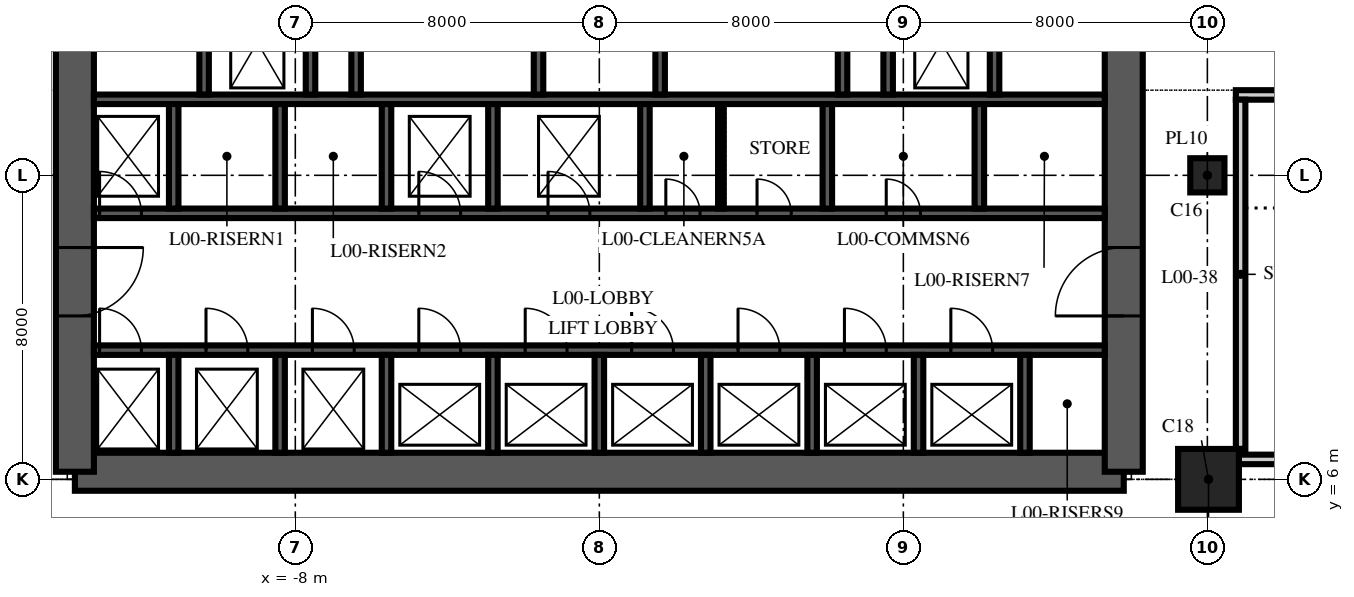
"""IFC4 building model, lengths in metres.
Left out: names, types, materials, properties, quantities, classifications, styles, units other than length and angle.
Written with IfcOpenShell. Run it as: python <this file> out.ifc"""

import sys

from ifc_helpers import new_model, si_unit, direction, frame, frame_2d, origin, origin_2d, place, context, subcontext, project, spatial, polyline, rectangle, outline, extrude, element, fill, save


model = new_model("IFC4")
c1 = context("Model", 3, precision=1e-05, world=origin(), true_north=direction((0.0, 1.0)))
c2 = subcontext(c1, "Body", "Model", "MODEL_VIEW")
j1 = project(units=[si_unit("LENGTHUNIT", "METRE"), si_unit("PLANEANGLEUNIT", "RADIAN")], contexts=[c1])
p1 = place(None, origin())
s1 = spatial("IfcSite", under=j1, at=p1, CompositionType="ELEMENT")
p2 = place(p1, origin())
s2 = spatial("IfcBuilding", under=s1, at=p2, CompositionType="ELEMENT")
p3 = place(p2, origin())
s3 = spatial("IfcBuildingStorey", under=s2, at=p3, CompositionType="ELEMENT", Elevation=0.0)
p4 = place(p3, frame((16.03, 6.0, 0.0), z_axis=(0.0, 0.0, 1.0), x_axis=(1.0, 0.0, 0.0)))
e1 = element("IfcColumn", 1, at=p4, inside=s3, PredefinedType="COLUMN", context=c2, shape_type="SweptSolid", body=[
    extrude(rectangle(XDim=1.6, YDim=1.6, at=origin_2d()), origin(), (0.0, 0.0, 1.0), 6.0),
])
p5 = place(p3, frame((16.0, 14.0, 0.0), z_axis=(0.0, 0.0, 1.0), x_axis=(1.0, 0.0, 0.0)))
e2 = element("IfcColumn", 2, at=p5, inside=s3, PredefinedType="COLUMN", context=c2, shape_type="SweptSolid", body=[
    extrude(rectangle(XDim=0.9, YDim=0.9, at=origin_2d()), origin(), (0.0, 0.0, 1.0), 6.0),
])
p6 = place(p3, frame((-13.8, 6.2, 0.0), z_axis=(0.0, 0.0, 1.0), x_axis=(1.0, 0.0, 0.0)))
e3 = element("IfcWall", 3, at=p6, inside=s3, PredefinedType="SHEAR", context=c2, shape_type="SweptSolid", body=[
    extrude(rectangle(XDim=27.6, YDim=1.0, at=frame_2d((13.8, 0.0))), origin(), (0.0, 0.0, 1.0), 6.0),
])
p7 = place(p3, frame((13.8, 6.2, 0.0), z_axis=(0.0, 0.0, 1.0), x_axis=(0.0, 1.0, 0.0)))
e4 = element("IfcWall", 4, at=p7, inside=s3, PredefinedType="SHEAR", context=c2, shape_type="SweptSolid", body=[
    extrude(outline(polyline([(0.0, -0.5), (17.6, -0.5), (17.6, 0.0), (17.1, 0.0), (17.1, 0.5), (0.5, 0.5), (0.5, 0.0), (0.0, 0.0), (0.0, -0.5)])), origin(), (0.0, 0.0, 1.0), 6.0),
])
p8 = place(p7, frame((4.1, 0.0, 0.0)))
e5 = element("IfcOpeningElement", 5, at=p8, cuts=e4, PredefinedType="OPENING", context=c2, shape_type="SweptSolid", body=[
    extrude(rectangle(XDim=1.8, YDim=2.4, at=frame_2d((0.9, 1.2))), frame((0.0, 0.515, 0.0), z_axis=(0.0, -1.0, 0.0), x_axis=(1.0, 0.0, 0.0)), (0.0, 0.0, 1.0), 1.03),
])
p9 = place(p3, frame((-13.8, 23.8, 0.0), z_axis=(0.0, 0.0, 1.0), x_axis=(0.0, -1.0, 0.0)))
e6 = element("IfcWall", 6, at=p9, inside=s3, PredefinedType="SHEAR", context=c2, shape_type="SweptSolid", body=[
    extrude(outline(polyline([(0.0, -0.5), (17.6, -0.5), (17.6, 0.0), (17.1, 0.0), (17.1, 0.5), (0.5, 0.5), (0.5, 0.0), (0.0, 0.0), (0.0, -0.5)])), origin(), (0.0, 0.0, 1.0), 6.0),
])
p10 = place(p9, frame((11.7, 0.0, 0.0)))
e7 = element("IfcOpeningElement", 7, at=p10, cuts=e6, PredefinedType="OPENING", context=c2, shape_type="SweptSolid", body=[
    extrude(rectangle(XDim=1.8, YDim=2.4, at=frame_2d((0.9, 1.2))), frame((0.0, 0.515, 0.0), z_axis=(0.0, -1.0, 0.0), x_axis=(1.0, 0.0, 0.0)), (0.0, 0.0, 1.0), 1.03),
])
p11 = place(p3, frame((-13.3, 9.4, 0.0), z_axis=(0.0, 0.0, 1.0), x_axis=(1.0, 0.0, 0.0)))
e8 = element("IfcWall", 8, at=p11, inside=s3, PredefinedType="SHEAR", context=c2, shape_type="SweptSolid", body=[
    extrude(rectangle(XDim=26.6, YDim=0.25, at=frame_2d((13.3, 0.0))), origin(), (0.0, 0.0, 1.0), 6.0),
])
p12 = place(p11, frame((0.15, 0.0, 0.0)))
e9 = element("IfcOpeningElement", 9, at=p12, cuts=e8, PredefinedType="OPENING", context=c2, shape_type="SweptSolid", body=[
    extrude(rectangle(XDim=1.1, YDim=2.1, at=frame_2d((0.55, 1.05))), frame((0.0, 0.14, 0.0), z_axis=(0.0, -1.0, 0.0), x_axis=(1.0, 0.0, 0.0)), (0.0, 0.0, 1.0), 0.28),
])
p13 = place(p11, frame((2.95, 0.0, 0.0)))
e10 = element("IfcOpeningElement", 10, at=p13, cuts=e8, PredefinedType="OPENING", context=c2, shape_type="SweptSolid", body=[
    extrude(rectangle(XDim=1.1, YDim=2.1, at=frame_2d((0.55, 1.05))), frame((0.0, 0.14, 0.0), z_axis=(0.0, -1.0, 0.0), x_axis=(1.0, 0.0, 0.0)), (0.0, 0.0, 1.0), 0.28),
])
p14 = place(p11, frame((5.75, 0.0, 0.0)))
e11 = element("IfcOpeningElement", 11, at=p14, cuts=e8, PredefinedType="OPENING", context=c2, shape_type="SweptSolid", body=[
    extrude(rectangle(XDim=1.1, YDim=2.1, at=frame_2d((0.55, 1.05))), frame((0.0, 0.14, 0.0), z_axis=(0.0, -1.0, 0.0), x_axis=(1.0, 0.0, 0.0)), (0.0, 0.0, 1.0), 0.28),
])
p15 = place(p11, frame((8.55, 0.0, 0.0)))
e12 = element("IfcOpeningElement", 12, at=p15, cuts=e8, PredefinedType="OPENING", context=c2, shape_type="SweptSolid", body=[
    extrude(rectangle(XDim=1.1, YDim=2.1, at=frame_2d((0.55, 1.05))), frame((0.0, 0.14, 0.0), z_axis=(0.0, -1.0, 0.0), x_axis=(1.0, 0.0, 0.0)), (0.0, 0.0, 1.0), 0.28),
])
p16 = place(p11, frame((11.35, 0.0, 0.0)))
e13 = element("IfcOpeningElement", 13, at=p16, cuts=e8, PredefinedType="OPENING", context=c2, shape_type="SweptSolid", body=[
    extrude(rectangle(XDim=1.1, YDim=2.1, at=frame_2d((0.55, 1.05))), frame((0.0, 0.14, 0.0), z_axis=(0.0, -1.0, 0.0), x_axis=(1.0, 0.0, 0.0)), (0.0, 0.0, 1.0), 0.28),
])
p17 = place(p11, frame((14.15, 0.0, 0.0)))
e14 = element("IfcOpeningElement", 14, at=p17, cuts=e8, PredefinedType="OPENING", context=c2, shape_type="SweptSolid", body=[
    extrude(rectangle(XDim=1.1, YDim=2.1, at=frame_2d((0.55, 1.05))), frame((0.0, 0.14, 0.0), z_axis=(0.0, -1.0, 0.0), x_axis=(1.0, 0.0, 0.0)), (0.0, 0.0, 1.0), 0.28),
])
p18 = place(p11, frame((16.95, 0.0, 0.0)))
e15 = element("IfcOpeningElement", 15, at=p18, cuts=e8, PredefinedType="OPENING", context=c2, shape_type="SweptSolid", body=[
    extrude(rectangle(XDim=1.1, YDim=2.1, at=frame_2d((0.55, 1.05))), frame((0.0, 0.14, 0.0), z_axis=(0.0, -1.0, 0.0), x_axis=(1.0, 0.0, 0.0)), (0.0, 0.0, 1.0), 0.28),
])
p19 = place(p11, frame((19.75, 0.0, 0.0)))
e16 = element("IfcOpeningElement", 16, at=p19, cuts=e8, PredefinedType="OPENING", context=c2, shape_type="SweptSolid", body=[
    extrude(rectangle(XDim=1.1, YDim=2.1, at=frame_2d((0.55, 1.05))), frame((0.0, 0.14, 0.0), z_axis=(0.0, -1.0, 0.0), x_axis=(1.0, 0.0, 0.0)), (0.0, 0.0, 1.0), 0.28),
])
p20 = place(p11, frame((22.55, 0.0, 0.0)))
e17 = element("IfcOpeningElement", 17, at=p20, cuts=e8, PredefinedType="OPENING", context=c2, shape_type="SweptSolid", body=[
    extrude(rectangle(XDim=1.1, YDim=2.1, at=frame_2d((0.55, 1.05))), frame((0.0, 0.14, 0.0), z_axis=(0.0, -1.0, 0.0), x_axis=(1.0, 0.0, 0.0)), (0.0, 0.0, 1.0), 0.28),
])
p21 = place(p3, frame((-13.3, 13.0, 0.0), z_axis=(0.0, 0.0, 1.0), x_axis=(1.0, 0.0, 0.0)))
e18 = element("IfcWall", 18, at=p21, inside=s3, PredefinedType="SHEAR", context=c2, shape_type="SweptSolid", body=[
    extrude(rectangle(XDim=26.6, YDim=0.25, at=frame_2d((13.3, 0.0))), origin(), (0.0, 0.0, 1.0), 6.0),
])
p22 = place(p21, frame((0.15, 0.0, 0.0)))
e19 = element("IfcOpeningElement", 19, at=p22, cuts=e18, PredefinedType="OPENING", context=c2, shape_type="SweptSolid", body=[
    extrude(rectangle(XDim=1.1, YDim=2.1, at=frame_2d((0.55, 1.05))), frame((0.0, 0.14, 0.0), z_axis=(0.0, -1.0, 0.0), x_axis=(1.0, 0.0, 0.0)), (0.0, 0.0, 1.0), 0.28),
])
p23 = place(p21, frame((8.55, 0.0, 0.0)))
e20 = element("IfcOpeningElement", 20, at=p23, cuts=e18, PredefinedType="OPENING", context=c2, shape_type="SweptSolid", body=[
    extrude(rectangle(XDim=1.1, YDim=2.1, at=frame_2d((0.55, 1.05))), frame((0.0, 0.14, 0.0), z_axis=(0.0, -1.0, 0.0), x_axis=(1.0, 0.0, 0.0)), (0.0, 0.0, 1.0), 0.28),
])
p24 = place(p21, frame((11.95, 0.0, 0.0)))
e21 = element("IfcOpeningElement", 21, at=p24, cuts=e18, PredefinedType="OPENING", context=c2, shape_type="SweptSolid", body=[
    extrude(rectangle(XDim=1.1, YDim=2.1, at=frame_2d((0.55, 1.05))), frame((0.0, 0.14, 0.0), z_axis=(0.0, -1.0, 0.0), x_axis=(1.0, 0.0, 0.0)), (0.0, 0.0, 1.0), 0.28),
])
p25 = place(p21, frame((15.05, 0.0, 0.0)))
e22 = element("IfcOpeningElement", 22, at=p25, cuts=e18, PredefinedType="OPENING", context=c2, shape_type="SweptSolid", body=[
    extrude(rectangle(XDim=0.9, YDim=2.1, at=frame_2d((0.45, 1.05))), frame((0.0, 0.14, 0.0), z_axis=(0.0, -1.0, 0.0), x_axis=(1.0, 0.0, 0.0)), (0.0, 0.0, 1.0), 0.28),
])
p26 = place(p21, frame((17.45, 0.0, 0.0)))
e23 = element("IfcOpeningElement", 23, at=p26, cuts=e18, PredefinedType="OPENING", context=c2, shape_type="SweptSolid", body=[
    extrude(rectangle(XDim=0.9, YDim=2.1, at=frame_2d((0.45, 1.05))), frame((0.0, 0.14, 0.0), z_axis=(0.0, -1.0, 0.0), x_axis=(1.0, 0.0, 0.0)), (0.0, 0.0, 1.0), 0.28),
])
p27 = place(p21, frame((20.85, 0.0, 0.0)))
e24 = element("IfcOpeningElement", 24, at=p27, cuts=e18, PredefinedType="OPENING", context=c2, shape_type="SweptSolid", body=[
    extrude(rectangle(XDim=0.9, YDim=2.1, at=frame_2d((0.45, 1.05))), frame((0.0, 0.14, 0.0), z_axis=(0.0, -1.0, 0.0), x_axis=(1.0, 0.0, 0.0)), (0.0, 0.0, 1.0), 0.28),
])
p28 = place(p3, frame((-13.3, 16.0, 0.0), z_axis=(0.0, 0.0, 1.0), x_axis=(1.0, 0.0, 0.0)))
e25 = element("IfcWall", 25, at=p28, inside=s3, PredefinedType="SHEAR", context=c2, shape_type="SweptSolid", body=[
    extrude(rectangle(XDim=26.6, YDim=0.25, at=frame_2d((13.3, 0.0))), origin(), (0.0, 0.0, 1.0), 6.0),
])
for number, where, z_axis, x_axis in (
    (26, (-11.2, 6.7, 0.0), (0.0, 0.0, 1.0), (0.0, 1.0, 0.0)),
    (27, (-8.4, 6.7, 0.0), (0.0, 0.0, 1.0), (0.0, 1.0, 0.0)),
    (28, (-5.6, 6.7, 0.0), (0.0, 0.0, 1.0), (0.0, 1.0, 0.0)),
    (29, (-2.8, 6.7, 0.0), (0.0, 0.0, 1.0), (0.0, 1.0, 0.0)),
    (30, (0.0, 6.7, 0.0), (0.0, 0.0, 1.0), (0.0, 1.0, 0.0)),
    (31, (2.8, 6.7, 0.0), (0.0, 0.0, 1.0), (0.0, 1.0, 0.0)),
    (32, (5.6, 6.7, 0.0), (0.0, 0.0, 1.0), (0.0, 1.0, 0.0)),
    (33, (8.4, 6.7, 0.0), (0.0, 0.0, 1.0), (0.0, 1.0, 0.0)),
    (34, (11.2, 6.7, 0.0), (0.0, 0.0, 1.0), (0.0, 1.0, 0.0)),
):
    element("IfcWall", number, at=place(p3, frame(where, z_axis=z_axis, x_axis=x_axis)), inside=s3, PredefinedType="SHEAR", context=c2, shape_type="SweptSolid", body=[
        extrude(rectangle(XDim=2.575, YDim=0.25, at=frame_2d((1.288, 0.0))), origin(), (0.0, 0.0, 1.0), 6.0),
    ])
for number, where, z_axis, x_axis in (
    (35, (-11.2, 13.125, 0.0), (0.0, 0.0, 1.0), (0.0, 1.0, 0.0)),
    (36, (-8.4, 13.125, 0.0), (0.0, 0.0, 1.0), (0.0, 1.0, 0.0)),
    (37, (-5.6, 13.125, 0.0), (0.0, 0.0, 1.0), (0.0, 1.0, 0.0)),
    (38, (-2.8, 13.125, 0.0), (0.0, 0.0, 1.0), (0.0, 1.0, 0.0)),
    (39, (1.2, 13.125, 0.0), (0.0, 0.0, 1.0), (0.0, 1.0, 0.0)),
    (40, (6.0, 13.125, 0.0), (0.0, 0.0, 1.0), (0.0, 1.0, 0.0)),
    (41, (10.0, 13.125, 0.0), (0.0, 0.0, 1.0), (0.0, 1.0, 0.0)),
):
    element("IfcWall", number, at=place(p3, frame(where, z_axis=z_axis, x_axis=x_axis)), inside=s3, PredefinedType="SHEAR", context=c2, shape_type="SweptSolid", body=[
        extrude(rectangle(XDim=2.75, YDim=0.25, at=frame_2d((1.375, 0.0))), origin(), (0.0, 0.0, 1.0), 6.0),
    ])
p29 = place(p3, frame((-10.4, 16.125, 0.0), z_axis=(0.0, 0.0, 1.0), x_axis=(0.0, 1.0, 0.0)))
e42 = element("IfcWall", 42, at=p29, inside=s3, PredefinedType="SHEAR", context=c2, shape_type="SweptSolid", body=[
    extrude(rectangle(XDim=7.175, YDim=0.25, at=frame_2d((3.587, 0.0))), origin(), (0.0, 0.0, 1.0), 6.0),
])
p30 = place(p29, frame((5.975, 0.0, 0.0)))
e43 = element("IfcOpeningElement", 43, at=p30, cuts=e42, PredefinedType="OPENING", context=c2, shape_type="SweptSolid", body=[
    extrude(rectangle(XDim=1.0, YDim=2.1, at=frame_2d((0.5, 1.05))), frame((0.0, 0.14, 0.0), z_axis=(0.0, -1.0, 0.0), x_axis=(1.0, 0.0, 0.0)), (0.0, 0.0, 1.0), 0.28),
])
for number, where, z_axis, x_axis in (
    (44, (-6.4, 16.125, 0.0), (0.0, 0.0, 1.0), (0.0, 1.0, 0.0)),
    (45, (-1.6, 16.125, 0.0), (0.0, 0.0, 1.0), (0.0, 1.0, 0.0)),
    (46, (1.6, 16.125, 0.0), (0.0, 0.0, 1.0), (0.0, 1.0, 0.0)),
    (47, (6.4, 16.125, 0.0), (0.0, 0.0, 1.0), (0.0, 1.0, 0.0)),
):
    element("IfcWall", number, at=place(p3, frame(where, z_axis=z_axis, x_axis=x_axis)), inside=s3, PredefinedType="SHEAR", context=c2, shape_type="SweptSolid", body=[
        extrude(rectangle(XDim=7.175, YDim=0.25, at=frame_2d((3.587, 0.0))), origin(), (0.0, 0.0, 1.0), 6.0),
    ])
p31 = place(p3, frame((10.4, 16.125, 0.0), z_axis=(0.0, 0.0, 1.0), x_axis=(0.0, 1.0, 0.0)))
e48 = element("IfcWall", 48, at=p31, inside=s3, PredefinedType="SHEAR", context=c2, shape_type="SweptSolid", body=[
    extrude(rectangle(XDim=7.175, YDim=0.25, at=frame_2d((3.587, 0.0))), origin(), (0.0, 0.0, 1.0), 6.0),
])
p32 = place(p31, frame((5.975, 0.0, 0.0)))
e49 = element("IfcOpeningElement", 49, at=p32, cuts=e48, PredefinedType="OPENING", context=c2, shape_type="SweptSolid", body=[
    extrude(rectangle(XDim=1.0, YDim=2.1, at=frame_2d((0.5, 1.05))), frame((0.0, 0.14, 0.0), z_axis=(0.0, -1.0, 0.0), x_axis=(1.0, 0.0, 0.0)), (0.0, 0.0, 1.0), 0.28),
])
for number, where, z_axis, x_axis in (
    (50, (-7.6, 16.125, 0.0), (0.0, 0.0, 1.0), (0.0, 1.0, 0.0)),
    (51, (7.6, 16.125, 0.0), (0.0, 0.0, 1.0), (0.0, 1.0, 0.0)),
):
    element("IfcWall", number, at=place(p3, frame(where, z_axis=z_axis, x_axis=x_axis)), inside=s3, PredefinedType="SHEAR", context=c2, shape_type="SweptSolid", body=[
        extrude(rectangle(XDim=2.75, YDim=0.25, at=frame_2d((1.375, 0.0))), origin(), (0.0, 0.0, 1.0), 6.0),
    ])
p33 = place(p3, frame((3.2, 13.125, 0.0), z_axis=(0.0, 0.0, 1.0), x_axis=(0.0, 1.0, 0.0)))
e52 = element("IfcWall", 52, at=p33, inside=s3, PredefinedType="PARTITIONING", context=c2, shape_type="SweptSolid", body=[
    extrude(rectangle(XDim=2.75, YDim=0.15, at=frame_2d((1.375, 0.0))), origin(), (0.0, 0.0, 1.0), 5.85),
])
p34 = place(p3, frame((16.8, 6.525, 0.0), z_axis=(0.0, 0.0, 1.0), x_axis=(1.0, 0.0, 0.0)))
e53 = element("IfcWall", 53, at=p34, inside=s3, PredefinedType="SOLIDWALL", context=c2, shape_type="SweptSolid", body=[
    extrude(rectangle(XDim=6.35, YDim=0.25, at=frame_2d((3.175, 0.0))), origin(), (0.0, 0.0, 1.0), 5.05),
])
p35 = place(p3, frame((23.15, 16.115, 0.0), z_axis=(0.0, 0.0, 1.0), x_axis=(-1.0, 0.0, 0.0)))
e54 = element("IfcWall", 54, at=p35, inside=s3, PredefinedType="SOLIDWALL", context=c2, shape_type="SweptSolid", body=[
    extrude(rectangle(XDim=6.4, YDim=0.25, at=frame_2d((3.2, 0.0))), origin(), (0.0, 0.0, 1.0), 6.0),
])
p36 = place(p35, frame((0.75, 0.0, 0.0)))
e55 = element("IfcOpeningElement", 55, at=p36, cuts=e54, PredefinedType="OPENING", context=c2, shape_type="SweptSolid", body=[
    extrude(rectangle(XDim=1.8, YDim=2.1, at=frame_2d((0.9, 1.05))), frame((0.0, 0.14, 0.0), z_axis=(0.0, -1.0, 0.0), x_axis=(1.0, 0.0, 0.0)), (0.0, 0.0, 1.0), 0.28),
])
p37 = place(p3, frame((16.875, 15.99, 0.0), z_axis=(0.0, 0.0, 1.0), x_axis=(0.0, -1.0, 0.0)))
e56 = element("IfcWall", 56, at=p37, inside=s3, PredefinedType="SOLIDWALL", context=c2, shape_type="SweptSolid", body=[
    extrude(rectangle(XDim=9.19, YDim=0.25, at=frame_2d((4.595, 0.0))), origin(), (0.0, 0.0, 1.0), 6.0),
])
p38 = place(p8, origin())
e57 = element("IfcDoor", 57, at=p38, inside=s3, OperationType="DOUBLE_DOOR_SINGLE_SWING", PredefinedType="DOOR", context=c2, shape_type="SweptSolid", body=[
    extrude(rectangle(XDim=1.8, YDim=2.4, at=frame_2d((0.9, 1.2))), frame((0.0, 0.5, 0.0), z_axis=(0.0, -1.0, 0.0), x_axis=(1.0, 0.0, 0.0)), (0.0, 0.0, 1.0), 1.0),
])
fill(e5, e57)
p39 = place(p10, origin())
e58 = element("IfcDoor", 58, at=p39, inside=s3, OperationType="DOUBLE_DOOR_SINGLE_SWING", PredefinedType="DOOR", context=c2, shape_type="SweptSolid", body=[
    extrude(rectangle(XDim=1.8, YDim=2.4, at=frame_2d((0.9, 1.2))), frame((0.0, 0.5, 0.0), z_axis=(0.0, -1.0, 0.0), x_axis=(1.0, 0.0, 0.0)), (0.0, 0.0, 1.0), 1.0),
])
fill(e7, e58)
p40 = place(p12, origin())
e59 = element("IfcDoor", 59, at=p40, inside=s3, OperationType="SLIDING_TO_LEFT", PredefinedType="DOOR", context=c2, shape_type="SweptSolid", body=[
    extrude(rectangle(XDim=1.1, YDim=2.1, at=frame_2d((0.55, 1.05))), frame((0.0, 0.125, 0.0), z_axis=(0.0, -1.0, 0.0), x_axis=(1.0, 0.0, 0.0)), (0.0, 0.0, 1.0), 0.25),
])
fill(e9, e59)
p41 = place(p13, origin())
e60 = element("IfcDoor", 60, at=p41, inside=s3, OperationType="SLIDING_TO_LEFT", PredefinedType="DOOR", context=c2, shape_type="SweptSolid", body=[
    extrude(rectangle(XDim=1.1, YDim=2.1, at=frame_2d((0.55, 1.05))), frame((0.0, 0.125, 0.0), z_axis=(0.0, -1.0, 0.0), x_axis=(1.0, 0.0, 0.0)), (0.0, 0.0, 1.0), 0.25),
])
fill(e10, e60)
p42 = place(p14, origin())
e61 = element("IfcDoor", 61, at=p42, inside=s3, OperationType="SLIDING_TO_LEFT", PredefinedType="DOOR", context=c2, shape_type="SweptSolid", body=[
    extrude(rectangle(XDim=1.1, YDim=2.1, at=frame_2d((0.55, 1.05))), frame((0.0, 0.125, 0.0), z_axis=(0.0, -1.0, 0.0), x_axis=(1.0, 0.0, 0.0)), (0.0, 0.0, 1.0), 0.25),
])
fill(e11, e61)
p43 = place(p22, origin())
e62 = element("IfcDoor", 62, at=p43, inside=s3, OperationType="SLIDING_TO_LEFT", PredefinedType="DOOR", context=c2, shape_type="SweptSolid", body=[
    extrude(rectangle(XDim=1.1, YDim=2.1, at=frame_2d((0.55, 1.05))), frame((0.0, 0.125, 0.0), z_axis=(0.0, -1.0, 0.0), x_axis=(1.0, 0.0, 0.0)), (0.0, 0.0, 1.0), 0.25),
])
fill(e19, e62)
p44 = place(p23, origin())
e63 = element("IfcDoor", 63, at=p44, inside=s3, OperationType="SLIDING_TO_LEFT", PredefinedType="DOOR", context=c2, shape_type="SweptSolid", body=[
    extrude(rectangle(XDim=1.1, YDim=2.1, at=frame_2d((0.55, 1.05))), frame((0.0, 0.125, 0.0), z_axis=(0.0, -1.0, 0.0), x_axis=(1.0, 0.0, 0.0)), (0.0, 0.0, 1.0), 0.25),
])
fill(e20, e63)
p45 = place(p24, origin())
e64 = element("IfcDoor", 64, at=p45, inside=s3, OperationType="SLIDING_TO_LEFT", PredefinedType="DOOR", context=c2, shape_type="SweptSolid", body=[
    extrude(rectangle(XDim=1.1, YDim=2.1, at=frame_2d((0.55, 1.05))), frame((0.0, 0.125, 0.0), z_axis=(0.0, -1.0, 0.0), x_axis=(1.0, 0.0, 0.0)), (0.0, 0.0, 1.0), 0.25),
])
fill(e21, e64)
p46 = place(p15, origin())
e65 = element("IfcDoor", 65, at=p46, inside=s3, OperationType="SLIDING_TO_LEFT", PredefinedType="DOOR", context=c2, shape_type="SweptSolid", body=[
    extrude(rectangle(XDim=1.1, YDim=2.1, at=frame_2d((0.55, 1.05))), frame((0.0, 0.125, 0.0), z_axis=(0.0, -1.0, 0.0), x_axis=(1.0, 0.0, 0.0)), (0.0, 0.0, 1.0), 0.25),
])
fill(e12, e65)
p47 = place(p16, origin())
e66 = element("IfcDoor", 66, at=p47, inside=s3, OperationType="SLIDING_TO_LEFT", PredefinedType="DOOR", context=c2, shape_type="SweptSolid", body=[
    extrude(rectangle(XDim=1.1, YDim=2.1, at=frame_2d((0.55, 1.05))), frame((0.0, 0.125, 0.0), z_axis=(0.0, -1.0, 0.0), x_axis=(1.0, 0.0, 0.0)), (0.0, 0.0, 1.0), 0.25),
])
fill(e13, e66)
p48 = place(p17, origin())
e67 = element("IfcDoor", 67, at=p48, inside=s3, OperationType="SLIDING_TO_LEFT", PredefinedType="DOOR", context=c2, shape_type="SweptSolid", body=[
    extrude(rectangle(XDim=1.1, YDim=2.1, at=frame_2d((0.55, 1.05))), frame((0.0, 0.125, 0.0), z_axis=(0.0, -1.0, 0.0), x_axis=(1.0, 0.0, 0.0)), (0.0, 0.0, 1.0), 0.25),
])
fill(e14, e67)
p49 = place(p18, origin())
e68 = element("IfcDoor", 68, at=p49, inside=s3, OperationType="SLIDING_TO_LEFT", PredefinedType="DOOR", context=c2, shape_type="SweptSolid", body=[
    extrude(rectangle(XDim=1.1, YDim=2.1, at=frame_2d((0.55, 1.05))), frame((0.0, 0.125, 0.0), z_axis=(0.0, -1.0, 0.0), x_axis=(1.0, 0.0, 0.0)), (0.0, 0.0, 1.0), 0.25),
])
fill(e15, e68)
p50 = place(p19, origin())
e69 = element("IfcDoor", 69, at=p50, inside=s3, OperationType="SLIDING_TO_LEFT", PredefinedType="DOOR", context=c2, shape_type="SweptSolid", body=[
    extrude(rectangle(XDim=1.1, YDim=2.1, at=frame_2d((0.55, 1.05))), frame((0.0, 0.125, 0.0), z_axis=(0.0, -1.0, 0.0), x_axis=(1.0, 0.0, 0.0)), (0.0, 0.0, 1.0), 0.25),
])
fill(e16, e69)
p51 = place(p20, origin())
e70 = element("IfcDoor", 70, at=p51, inside=s3, OperationType="SLIDING_TO_LEFT", PredefinedType="DOOR", context=c2, shape_type="SweptSolid", body=[
    extrude(rectangle(XDim=1.1, YDim=2.1, at=frame_2d((0.55, 1.05))), frame((0.0, 0.125, 0.0), z_axis=(0.0, -1.0, 0.0), x_axis=(1.0, 0.0, 0.0)), (0.0, 0.0, 1.0), 0.25),
])
fill(e17, e70)
p52 = place(p25, origin())
e71 = element("IfcDoor", 71, at=p52, inside=s3, OperationType="SINGLE_SWING_LEFT", PredefinedType="DOOR", context=c2, shape_type="SweptSolid", body=[
    extrude(rectangle(XDim=0.9, YDim=2.1, at=frame_2d((0.45, 1.05))), frame((0.0, 0.125, 0.0), z_axis=(0.0, -1.0, 0.0), x_axis=(1.0, 0.0, 0.0)), (0.0, 0.0, 1.0), 0.25),
])
fill(e22, e71)
p53 = place(p26, origin())
e72 = element("IfcDoor", 72, at=p53, inside=s3, OperationType="SINGLE_SWING_LEFT", PredefinedType="DOOR", context=c2, shape_type="SweptSolid", body=[
    extrude(rectangle(XDim=0.9, YDim=2.1, at=frame_2d((0.45, 1.05))), frame((0.0, 0.125, 0.0), z_axis=(0.0, -1.0, 0.0), x_axis=(1.0, 0.0, 0.0)), (0.0, 0.0, 1.0), 0.25),
])
fill(e23, e72)
p54 = place(p27, origin())
e73 = element("IfcDoor", 73, at=p54, inside=s3, OperationType="SINGLE_SWING_LEFT", PredefinedType="DOOR", context=c2, shape_type="SweptSolid", body=[
    extrude(rectangle(XDim=0.9, YDim=2.1, at=frame_2d((0.45, 1.05))), frame((0.0, 0.125, 0.0), z_axis=(0.0, -1.0, 0.0), x_axis=(1.0, 0.0, 0.0)), (0.0, 0.0, 1.0), 0.25),
])
fill(e24, e73)
save(model, sys.argv[1])
